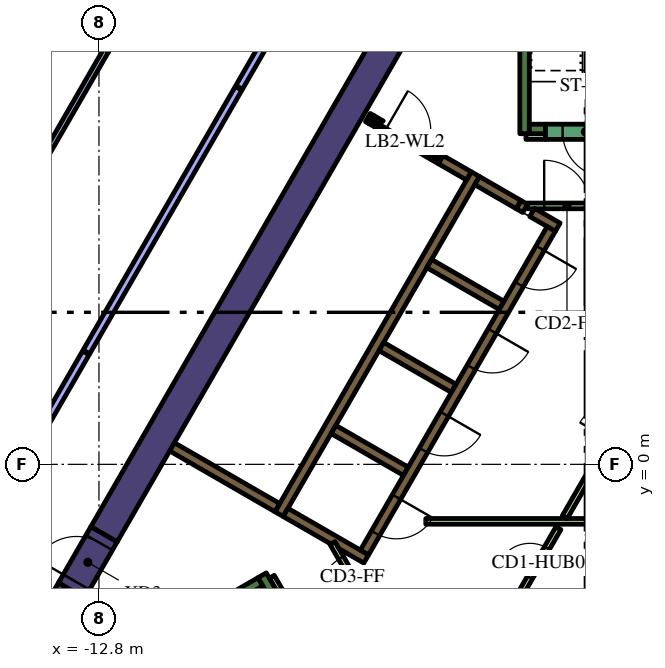
"""IFC4 building model, lengths in metres.
Left out: names, types, materials, properties, quantities, classifications, styles, units other than length and angle.
Written with IfcOpenShell. Run it as: python <this file> out.ifc"""

import sys

from ifc_helpers import new_model, si_unit, direction, frame, frame_2d, origin, place, context, subcontext, project, spatial, polyline, rectangle, outline, extrude, element, fill, save


model = new_model("IFC4")
c1 = context("Model", 3, precision=1e-05, world=origin(), true_north=direction((0.0, 1.0)))
c2 = subcontext(c1, "Body", "Model", "MODEL_VIEW")
j1 = project(units=[si_unit("LENGTHUNIT", "METRE"), si_unit("PLANEANGLEUNIT", "RADIAN")], contexts=[c1])
p1 = place(None, origin())
s1 = spatial("IfcSite", under=j1, at=p1, CompositionType="ELEMENT")
p2 = place(p1, origin())
s2 = spatial("IfcBuilding", under=s1, at=p2, CompositionType="ELEMENT")
p3 = place(p2, frame((0.0, 0.0, 171.0)))
s3 = spatial("IfcBuildingStorey", under=s2, at=p3, CompositionType="ELEMENT", Elevation=171.0)
p4 = place(p3, frame((-13.518, -3.314, 0.0), z_axis=(0.0, 0.0, 1.0), x_axis=(-0.499969377405, -0.866043083026, 0.0)))
e1 = element("IfcWall", 1, at=p4, inside=s3, PredefinedType="SOLIDWALL", context=c2, shape_type="SweptSolid", body=[
    extrude(rectangle(XDim=2.824, YDim=0.8, at=frame_2d((1.412, 0.0))), origin(), (0.0, 0.0, 1.0), 4.2),
])
p5 = place(p3, frame((-12.668, -1.842, 0.0), z_axis=(0.0, 0.0, 1.0), x_axis=(0.500003640647, 0.866023301845, 0.0)))
e2 = element("IfcWall", 2, at=p5, inside=s3, PredefinedType="SOLIDWALL", context=c2, shape_type="SweptSolid", body=[
    extrude(rectangle(XDim=15.858, YDim=0.8, at=frame_2d((7.929, 0.0))), origin(), (0.0, 0.0, 1.0), 4.2),
])
p6 = place(p3, frame((-1.6, 8.7, 0.0), z_axis=(0.0, 0.0, 1.0), x_axis=(0.0, 1.0, 0.0)))
e3 = element("IfcWall", 3, at=p6, inside=s3, PredefinedType="SOLIDWALL", context=c2, shape_type="SweptSolid", body=[
    extrude(rectangle(XDim=7.05, YDim=0.25, at=frame_2d((3.525, 0.0))), origin(), (0.0, 0.0, 1.0), 4.2),
])
p7 = place(p3, frame((-1.475, 8.825, 0.0), z_axis=(0.0, 0.0, 1.0), x_axis=(1.0, 0.0, 0.0)))
e4 = element("IfcWall", 4, at=p7, inside=s3, PredefinedType="SOLIDWALL", context=c2, shape_type="SweptSolid", body=[
    extrude(rectangle(XDim=0.425, YDim=0.25, at=frame_2d((0.212, 0.0))), origin(), (0.0, 0.0, 1.0), 4.2),
])
p8 = place(p3, frame((-14.44, -6.49, 0.0), z_axis=(0.0, 0.0, 1.0), x_axis=(0.866022966069, 0.500004222222, 0.0)))
e5 = element("IfcWall", 5, at=p8, inside=s3, PredefinedType="SOLIDWALL", context=c2, shape_type="SweptSolid", body=[
    extrude(rectangle(XDim=6.8, YDim=0.25, at=frame_2d((3.4, 0.0))), origin(), (0.0, 0.0, 1.0), 4.2),
])
p9 = place(p3, frame((-8.168, -3.503, 0.0), z_axis=(0.0, 0.0, 1.0), x_axis=(-0.499952099219, 0.866053057547, 0.0)))
e6 = element("IfcWall", 6, at=p9, inside=s3, PredefinedType="SOLIDWALL", context=c2, shape_type="SweptSolid", body=[
    extrude(rectangle(XDim=0.675, YDim=0.25, at=frame_2d((0.337, 0.0))), origin(), (0.0, 0.0, 1.0), 4.2),
])
p10 = place(p3, frame((-8.06, -1.311, 0.0), z_axis=(0.0, 0.0, 1.0), x_axis=(0.50000273126, 0.866023826885, 0.0)))
e7 = element("IfcWall", 7, at=p10, inside=s3, PredefinedType="SOLIDWALL", context=c2, shape_type="SweptSolid", body=[
    extrude(rectangle(XDim=10.33, YDim=0.25, at=frame_2d((5.165, 0.0))), origin(), (0.0, 0.0, 1.0), 4.2),
])
p11 = place(p3, frame((-1.758, 6.835, 0.0), z_axis=(0.0, 0.0, 1.0), x_axis=(0.865982457891, -0.500074377092, 0.0)))
e8 = element("IfcWall", 8, at=p11, inside=s3, PredefinedType="SOLIDWALL", context=c2, shape_type="SweptSolid", body=[
    extrude(rectangle(XDim=0.2, YDim=0.25, at=frame_2d((0.1, 0.0))), origin(), (0.0, 0.0, 1.0), 4.2),
])
p12 = place(p3, frame((-1.76, 6.836, 0.0), z_axis=(0.0, 0.0, 1.0), x_axis=(-0.865952863304, 0.500125622755, 0.0)))
e9 = element("IfcWall", 9, at=p12, inside=s3, PredefinedType="SOLIDWALL", context=c2, shape_type="SweptSolid", body=[
    extrude(rectangle(XDim=1.258, YDim=0.25, at=frame_2d((0.629, 0.0))), origin(), (0.0, 0.0, 1.0), 4.2),
])
p13 = place(p3, frame((-0.728, 6.24, 0.0), z_axis=(0.0, 0.0, 1.0), x_axis=(-0.865955664968, 0.500120771724, 0.0)))
e10 = element("IfcWall", 10, at=p13, inside=s3, PredefinedType="SOLIDWALL", context=c2, shape_type="SweptSolid", body=[
    extrude(rectangle(XDim=0.778, YDim=0.25, at=frame_2d((0.389, 0.0))), origin(), (0.0, 0.0, 1.0), 4.2),
])
for number, where, z_axis, x_axis in (
    (11, (-2.204, 4.182, 0.0), (0.0, 0.0, 1.0), (-0.866, 0.5, 0.0)),
    (12, (-5.369, 3.1, 0.0), (0.0, 0.0, 1.0), (0.866, -0.5, 0.0)),
    (13, (-4.724, -0.182, 0.0), (0.0, 0.0, 1.0), (-0.866, 0.5, 0.0)),
):
    element("IfcWall", number, at=place(p3, frame(where, z_axis=z_axis, x_axis=x_axis)), inside=s3, PredefinedType="SOLIDWALL", context=c2, shape_type="SweptSolid", body=[
        extrude(rectangle(XDim=2.2, YDim=0.25, at=frame_2d((1.1, 0.0))), origin(), (0.0, 0.0, 1.0), 4.2),
    ])
p14 = place(p3, origin())
e14 = element("IfcWall", 14, at=p14, inside=s3, PredefinedType="SOLIDWALL", context=c2, shape_type="SweptSolid", body=[
    extrude(outline(polyline([(-5.922, -2.257), (-5.922, -2.257), (-5.705, -2.382), (-5.83, -2.598), (-6.483, -2.221), (-6.591, -2.033), (-6.591, -2.033), (-6.7, -2.096), (-7.952, -1.373), (-7.827, -1.156), (-5.922, -2.257)])), origin(), (0.0, 0.0, 1.0), 4.2),
])
p15 = place(p3, frame((-8.106, -1.14, 0.0), z_axis=(0.0, 0.0, 1.0), x_axis=(-0.866008981251, 0.500028443584, 0.0)))
e15 = element("IfcWall", 15, at=p15, inside=s3, PredefinedType="SOLIDWALL", context=c2, shape_type="SweptSolid", body=[
    extrude(rectangle(XDim=3.2, YDim=0.25, at=frame_2d((1.6, 0.0))), origin(), (0.0, 0.0, 1.0), 4.2),
])
p16 = place(p3, frame((-5.725, 9.125, 0.0), z_axis=(0.0, 0.0, 1.0), x_axis=(0.866185586049, -0.49972245349, 0.0)))
e16 = element("IfcWall", 16, at=p16, inside=s3, PredefinedType="SOLIDWALL", context=c2, shape_type="SweptSolid", body=[
    extrude(rectangle(XDim=0.11, YDim=0.25, at=frame_2d((0.055, 0.0))), origin(), (0.0, 0.0, 1.0), 4.2),
])
p17 = place(p3, frame((-3.066, 7.59, 0.0), z_axis=(0.0, 0.0, 1.0), x_axis=(-0.866081358704, 0.49990307071, 0.0)))
e17 = element("IfcWall", 17, at=p17, inside=s3, PredefinedType="SOLIDWALL", context=c2, shape_type="SweptSolid", body=[
    extrude(rectangle(XDim=0.858, YDim=0.25, at=frame_2d((0.429, 0.0))), origin(), (0.0, 0.0, 1.0), 4.2),
])
e18 = element("IfcWall", 18, at=p14, inside=s3, PredefinedType="SOLIDWALL", context=c2, shape_type="SweptSolid", body=[
    extrude(outline(polyline([(-3.748, 8.128), (-3.813, 8.015), (-4.027, 8.139), (-4.017, 8.156), (-4.008, 8.173), (-4.0, 8.192), (-3.995, 8.21), (-3.991, 8.23), (-3.99, 8.25), (-3.99, 8.268), (-3.748, 8.128)])), origin(), (0.0, 0.0, 1.0), 4.2),
])
e19 = element("IfcWall", 19, at=p14, inside=s3, PredefinedType="SOLIDWALL", context=c2, shape_type="SweptSolid", body=[
    extrude(outline(polyline([(-5.689, 8.96), (-5.69, 8.961), (-5.565, 9.177), (-5.319, 9.035), (-5.335, 9.026), (-5.351, 9.015), (-5.366, 9.002), (-5.379, 8.988), (-5.392, 8.972), (-5.402, 8.956), (-5.412, 8.939), (-5.629, 9.064), (-5.629, 9.064), (-5.689, 8.96)])), origin(), (0.0, 0.0, 1.0), 4.2),
])
for number, where, z_axis, x_axis in (
    (20, (-8.252, -2.958, 0.0), (0.0, 0.0, 1.0), (0.5, -0.866, 0.0)),
    (21, (-1.564, 8.625, 0.0), (0.0, 0.0, 1.0), (1.0, 0.0, 0.0)),
):
    element("IfcWall", number, at=place(p3, frame(where, z_axis=z_axis, x_axis=x_axis)), inside=s3, PredefinedType="PARTITIONING", context=c2, shape_type="SweptSolid", body=[
        extrude(rectangle(XDim=0.514, YDim=0.15, at=frame_2d((0.257, 0.0))), origin(), (0.0, 0.0, 1.0), 3.15),
    ])
p18 = place(p3, frame((-4.2, -1.5, 0.0), z_axis=(0.0, 0.0, 1.0), x_axis=(1.0, 0.0, 0.0)))
e22 = element("IfcWall", 22, at=p18, inside=s3, PredefinedType="PARTITIONING", context=c2, shape_type="SweptSolid", body=[
    extrude(rectangle(XDim=9.359, YDim=0.15, at=frame_2d((4.68, 0.0))), origin(), (0.0, 0.0, 1.0), 3.15),
])
p19 = place(p3, frame((-0.544, -1.393, 0.0), z_axis=(0.0, 0.0, 1.0), x_axis=(0.499928740635, 0.866066541489, 0.0)))
e23 = element("IfcWall", 23, at=p19, inside=s3, PredefinedType="PARTITIONING", context=c2, shape_type="SweptSolid", body=[
    extrude(rectangle(XDim=1.912, YDim=0.15, at=frame_2d((0.956, 0.0))), origin(), (0.0, 0.0, 1.0), 3.15),
])
p20 = place(p3, frame((-0.898, 6.194, 0.0), z_axis=(0.0, 0.0, 1.0), x_axis=(-0.499996202215, -0.866027596426, 0.0)))
e24 = element("IfcWall", 24, at=p20, inside=s3, PredefinedType="SOLIDWALL", context=c2, shape_type="SweptSolid", body=[
    extrude(rectangle(XDim=9.83, YDim=0.25, at=frame_2d((4.915, 0.0))), origin(), (0.0, 0.0, 1.0), 4.2),
])
p21 = place(p20, frame((0.585, 0.0, 0.0)))
e25 = element("IfcOpeningElement", 25, at=p21, cuts=e24, PredefinedType="OPENING", context=c2, shape_type="SweptSolid", body=[
    extrude(rectangle(XDim=1.1, YDim=2.1, at=frame_2d((0.55, 1.05))), frame((0.0, 0.135, 0.0), z_axis=(0.0, -1.0, 0.0), x_axis=(1.0, 0.0, 0.0)), (0.0, 0.0, 1.0), 0.27),
])
p22 = place(p20, frame((3.105, 0.0, 0.0)))
e26 = element("IfcOpeningElement", 26, at=p22, cuts=e24, PredefinedType="OPENING", context=c2, shape_type="SweptSolid", body=[
    extrude(rectangle(XDim=1.1, YDim=2.1, at=frame_2d((0.55, 1.05))), frame((0.0, 0.135, 0.0), z_axis=(0.0, -1.0, 0.0), x_axis=(1.0, 0.0, 0.0)), (0.0, 0.0, 1.0), 0.27),
])
p23 = place(p20, frame((5.625, 0.0, 0.0)))
e27 = element("IfcOpeningElement", 27, at=p23, cuts=e24, PredefinedType="OPENING", context=c2, shape_type="SweptSolid", body=[
    extrude(rectangle(XDim=1.1, YDim=2.1, at=frame_2d((0.55, 1.05))), frame((0.0, 0.135, 0.0), z_axis=(0.0, -1.0, 0.0), x_axis=(1.0, 0.0, 0.0)), (0.0, 0.0, 1.0), 0.27),
])
p24 = place(p20, frame((8.145, 0.0, 0.0)))
e28 = element("IfcOpeningElement", 28, at=p24, cuts=e24, PredefinedType="OPENING", context=c2, shape_type="SweptSolid", body=[
    extrude(rectangle(XDim=1.1, YDim=2.1, at=frame_2d((0.55, 1.05))), frame((0.0, 0.135, 0.0), z_axis=(0.0, -1.0, 0.0), x_axis=(1.0, 0.0, 0.0)), (0.0, 0.0, 1.0), 0.27),
])
p25 = place(p3, frame((1.05, 8.75, 0.0), z_axis=(0.0, 0.0, 1.0), x_axis=(-1.0, 0.0, 0.0)))
e29 = element("IfcWall", 29, at=p25, inside=s3, PredefinedType="SOLIDWALL", context=c2, shape_type="SweptSolid", body=[
    extrude(rectangle(XDim=2.1, YDim=0.4, at=frame_2d((1.05, 0.0))), origin(), (0.0, 0.0, 1.0), 4.2),
])
p26 = place(p25, frame((0.45, 0.0, 0.0)))
e30 = element("IfcOpeningElement", 30, at=p26, cuts=e29, PredefinedType="OPENING", context=c2, shape_type="SweptSolid", body=[
    extrude(rectangle(XDim=1.2, YDim=2.1, at=frame_2d((0.6, 1.05))), frame((0.0, 0.21, 0.0), z_axis=(0.0, -1.0, 0.0), x_axis=(1.0, 0.0, 0.0)), (0.0, 0.0, 1.0), 0.42),
])
p27 = place(p3, frame((-1.76, -3.498, 0.0), z_axis=(0.0, 0.0, 1.0), x_axis=(0.499977374825, 0.866038466041, 0.0)))
e31 = element("IfcWall", 31, at=p27, inside=s3, PredefinedType="PARTITIONING", context=c2, shape_type="SweptSolid", body=[
    extrude(rectangle(XDim=2.1, YDim=0.15, at=frame_2d((1.05, 0.0))), origin(), (0.0, 0.0, 1.0), 3.15),
])
p28 = place(p27, frame((0.6, 0.0, 0.0)))
e32 = element("IfcOpeningElement", 32, at=p28, cuts=e31, PredefinedType="OPENING", context=c2, shape_type="SweptSolid", body=[
    extrude(rectangle(XDim=0.9, YDim=2.1, at=frame_2d((0.45, 1.05))), frame((0.0, 0.085, 0.0), z_axis=(0.0, -1.0, 0.0), x_axis=(1.0, 0.0, 0.0)), (0.0, 0.0, 1.0), 0.17),
])
p29 = place(p3, frame((-1.534, 6.8, 0.0), z_axis=(0.0, 0.0, 1.0), x_axis=(1.0, 0.0, 0.0)))
e33 = element("IfcWall", 33, at=p29, inside=s3, PredefinedType="PARTITIONING", context=c2, shape_type="SweptSolid", body=[
    extrude(rectangle(XDim=2.1, YDim=0.15, at=frame_2d((1.05, 0.0))), origin(), (0.0, 0.0, 1.0), 3.15),
])
p30 = place(p29, frame((0.45, 0.0, 0.0)))
e34 = element("IfcOpeningElement", 34, at=p30, cuts=e33, PredefinedType="OPENING", context=c2, shape_type="SweptSolid", body=[
    extrude(rectangle(XDim=1.2, YDim=2.1, at=frame_2d((0.6, 1.05))), frame((0.0, 0.085, 0.0), z_axis=(0.0, -1.0, 0.0), x_axis=(1.0, 0.0, 0.0)), (0.0, 0.0, 1.0), 0.17),
])
p31 = place(p3, frame((-5.606, -3.89, 0.0), z_axis=(0.0, 0.0, 1.0), x_axis=(-0.500027713859, 0.866009402589, 0.0)))
e35 = element("IfcWall", 35, at=p31, inside=s3, PredefinedType="PARTITIONING", context=c2, shape_type="SweptSolid", body=[
    extrude(rectangle(XDim=2.1, YDim=0.15, at=frame_2d((1.05, 0.0))), origin(), (0.0, 0.0, 1.0), 3.15),
])
p32 = place(p31, frame((0.45, 0.0, 0.0)))
e36 = element("IfcOpeningElement", 36, at=p32, cuts=e35, PredefinedType="OPENING", context=c2, shape_type="SweptSolid", body=[
    extrude(rectangle(XDim=1.2, YDim=2.1, at=frame_2d((0.6, 1.05))), frame((0.0, 0.085, 0.0), z_axis=(0.0, -1.0, 0.0), x_axis=(1.0, 0.0, 0.0)), (0.0, 0.0, 1.0), 0.17),
])
p33 = place(p3, frame((-5.659, 9.012, 0.0), z_axis=(0.0, 0.0, 1.0), x_axis=(0.866009402589, -0.500027713859, 0.0)))
e37 = element("IfcWall", 37, at=p33, inside=s3, PredefinedType="PARTITIONING", context=c2, shape_type="SweptSolid", body=[
    extrude(rectangle(XDim=2.1, YDim=0.12, at=frame_2d((1.05, 0.0))), origin(), (0.0, 0.0, 1.0), 3.15),
])
p34 = place(p33, frame((0.45, 0.0, 0.0)))
e38 = element("IfcOpeningElement", 38, at=p34, cuts=e37, PredefinedType="OPENING", context=c2, shape_type="SweptSolid", body=[
    extrude(rectangle(XDim=1.2, YDim=2.1, at=frame_2d((0.6, 1.05))), frame((0.0, 0.07, 0.0), z_axis=(0.0, -1.0, 0.0), x_axis=(1.0, 0.0, 0.0)), (0.0, 0.0, 1.0), 0.14),
])
p35 = place(p3, frame((-13.518, -3.314, 0.0), z_axis=(0.0, 0.0, 1.0), x_axis=(0.500000056704, 0.866025371046, 0.0)))
e39 = element("IfcWall", 39, at=p35, inside=s3, PredefinedType="SOLIDWALL", context=c2, shape_type="SweptSolid", body=[
    extrude(rectangle(XDim=1.7, YDim=0.8, at=frame_2d((0.85, 0.0))), origin(), (0.0, 0.0, 1.0), 4.2),
])
p36 = place(p35, frame((0.25, 0.0, 0.0)))
e40 = element("IfcOpeningElement", 40, at=p36, cuts=e39, PredefinedType="OPENING", context=c2, shape_type="SweptSolid", body=[
    extrude(rectangle(XDim=1.2, YDim=2.1, at=frame_2d((0.6, 1.05))), frame((0.0, 0.41, 0.0), z_axis=(0.0, -1.0, 0.0), x_axis=(1.0, 0.0, 0.0)), (0.0, 0.0, 1.0), 0.82),
])
p37 = place(p3, frame((-12.608, 10.899, 0.0), z_axis=(0.0, 0.0, 1.0), x_axis=(-0.499991792115, -0.866030142557, 0.0)))
e41 = element("IfcWall", 41, at=p37, inside=s3, PredefinedType="PARTITIONING", context=c2, shape_type="SweptSolid", body=[
    extrude(rectangle(XDim=3.06, YDim=0.15, at=frame_2d((1.53, 0.0))), origin(), (0.0, 0.0, 1.0), 3.15),
])
p38 = place(p3, frame((-9.126, 9.893, 0.0), z_axis=(0.0, 0.0, 1.0), x_axis=(-0.499995158272, -0.866028199139, 0.0)))
e42 = element("IfcWall", 42, at=p38, inside=s3, PredefinedType="PARTITIONING", context=c2, shape_type="SweptSolid", body=[
    extrude(rectangle(XDim=8.008, YDim=0.2, at=frame_2d((4.004, 0.0))), origin(), (0.0, 0.0, 1.0), 3.15),
])
p39 = place(p3, frame((-13.146, 2.931, 0.0), z_axis=(0.0, 0.0, 1.0), x_axis=(-0.499997861235, -0.866026638597, 0.0)))
e43 = element("IfcWall", 43, at=p39, inside=s3, PredefinedType="PARTITIONING", context=c2, shape_type="SweptSolid", body=[
    extrude(rectangle(XDim=10.717, YDim=0.2, at=frame_2d((5.359, 0.0))), origin(), (0.0, 0.0, 1.0), 3.15),
])
p40 = place(p39, frame((4.9, 0.0, 0.0)))
e44 = element("IfcOpeningElement", 44, at=p40, cuts=e43, PredefinedType="OPENING", context=c2, shape_type="SweptSolid", body=[
    extrude(rectangle(XDim=1.0, YDim=2.1, at=frame_2d((0.5, 1.05))), frame((0.0, 0.11, 0.0), z_axis=(0.0, -1.0, 0.0), x_axis=(1.0, 0.0, 0.0)), (0.0, 0.0, 1.0), 0.22),
])
p41 = place(p3, frame((-4.757, 17.461, 0.0), z_axis=(0.0, 0.0, 1.0), x_axis=(-0.499998278779, -0.866026397529, 0.0)))
e45 = element("IfcWall", 45, at=p41, inside=s3, PredefinedType="PARTITIONING", context=c2, shape_type="SweptSolid", body=[
    extrude(rectangle(XDim=8.709, YDim=0.2, at=frame_2d((4.354, 0.0))), origin(), (0.0, 0.0, 1.0), 3.15),
])
p42 = place(p21, origin())
e46 = element("IfcDoor", 46, at=p42, inside=s3, OperationType="DOUBLE_DOOR_SLIDING", PredefinedType="DOOR", context=c2, shape_type="SweptSolid", body=[
    extrude(rectangle(XDim=1.1, YDim=2.1, at=frame_2d((0.55, 1.05))), frame((0.0, 0.025, 0.0), z_axis=(0.0, -1.0, 0.0), x_axis=(1.0, 0.0, 0.0)), (0.0, 0.0, 1.0), 0.05),
])
fill(e25, e46)
p43 = place(p22, origin())
e47 = element("IfcDoor", 47, at=p43, inside=s3, OperationType="DOUBLE_DOOR_SLIDING", PredefinedType="DOOR", context=c2, shape_type="SweptSolid", body=[
    extrude(rectangle(XDim=1.1, YDim=2.1, at=frame_2d((0.55, 1.05))), frame((0.0, 0.025, 0.0), z_axis=(0.0, -1.0, 0.0), x_axis=(1.0, 0.0, 0.0)), (0.0, 0.0, 1.0), 0.05),
])
fill(e26, e47)
p44 = place(p23, origin())
e48 = element("IfcDoor", 48, at=p44, inside=s3, OperationType="DOUBLE_DOOR_SLIDING", PredefinedType="DOOR", context=c2, shape_type="SweptSolid", body=[
    extrude(rectangle(XDim=1.1, YDim=2.1, at=frame_2d((0.55, 1.05))), frame((0.0, 0.025, 0.0), z_axis=(0.0, -1.0, 0.0), x_axis=(1.0, 0.0, 0.0)), (0.0, 0.0, 1.0), 0.05),
])
fill(e27, e48)
p45 = place(p24, origin())
e49 = element("IfcDoor", 49, at=p45, inside=s3, OperationType="DOUBLE_DOOR_SLIDING", PredefinedType="DOOR", context=c2, shape_type="SweptSolid", body=[
    extrude(rectangle(XDim=1.1, YDim=2.1, at=frame_2d((0.55, 1.05))), frame((0.0, 0.025, 0.0), z_axis=(0.0, -1.0, 0.0), x_axis=(1.0, 0.0, 0.0)), (0.0, 0.0, 1.0), 0.05),
])
fill(e28, e49)
p46 = place(p26, origin())
e50 = element("IfcDoor", 50, at=p46, inside=s3, OperationType="SINGLE_SWING_LEFT", PredefinedType="DOOR", context=c2, shape_type="SweptSolid", body=[
    extrude(rectangle(XDim=1.2, YDim=2.1, at=frame_2d((0.6, 1.05))), frame((0.0, 0.025, 0.0), z_axis=(0.0, -1.0, 0.0), x_axis=(1.0, 0.0, 0.0)), (0.0, 0.0, 1.0), 0.05),
])
fill(e30, e50)
p47 = place(p28, origin())
e51 = element("IfcDoor", 51, at=p47, inside=s3, OperationType="SINGLE_SWING_LEFT", PredefinedType="DOOR", context=c2, shape_type="SweptSolid", body=[
    extrude(rectangle(XDim=0.9, YDim=2.1, at=frame_2d((0.45, 1.05))), frame((0.0, 0.025, 0.0), z_axis=(0.0, -1.0, 0.0), x_axis=(1.0, 0.0, 0.0)), (0.0, 0.0, 1.0), 0.05),
])
fill(e32, e51)
p48 = place(p30, origin())
e52 = element("IfcDoor", 52, at=p48, inside=s3, OperationType="SINGLE_SWING_LEFT", PredefinedType="DOOR", context=c2, shape_type="SweptSolid", body=[
    extrude(rectangle(XDim=1.2, YDim=2.1, at=frame_2d((0.6, 1.05))), frame((0.0, 0.025, 0.0), z_axis=(0.0, -1.0, 0.0), x_axis=(1.0, 0.0, 0.0)), (0.0, 0.0, 1.0), 0.05),
])
fill(e34, e52)
p49 = place(p32, origin())
e53 = element("IfcDoor", 53, at=p49, inside=s3, OperationType="SINGLE_SWING_LEFT", PredefinedType="DOOR", context=c2, shape_type="SweptSolid", body=[
    extrude(rectangle(XDim=1.2, YDim=2.1, at=frame_2d((0.6, 1.05))), frame((0.0, 0.025, 0.0), z_axis=(0.0, -1.0, 0.0), x_axis=(1.0, 0.0, 0.0)), (0.0, 0.0, 1.0), 0.05),
])
fill(e36, e53)
p50 = place(p34, origin())
e54 = element("IfcDoor", 54, at=p50, inside=s3, OperationType="SINGLE_SWING_LEFT", PredefinedType="DOOR", context=c2, shape_type="SweptSolid", body=[
    extrude(rectangle(XDim=1.2, YDim=2.1, at=frame_2d((0.6, 1.05))), frame((0.0, 0.025, 0.0), z_axis=(0.0, -1.0, 0.0), x_axis=(1.0, 0.0, 0.0)), (0.0, 0.0, 1.0), 0.05),
])
fill(e38, e54)
p51 = place(p36, origin())
e55 = element("IfcDoor", 55, at=p51, inside=s3, OperationType="SINGLE_SWING_LEFT", PredefinedType="DOOR", context=c2, shape_type="SweptSolid", body=[
    extrude(rectangle(XDim=1.2, YDim=2.1, at=frame_2d((0.6, 1.05))), frame((0.0, 0.025, 0.0), z_axis=(0.0, -1.0, 0.0), x_axis=(1.0, 0.0, 0.0)), (0.0, 0.0, 1.0), 0.05),
])
fill(e40, e55)
save(model, sys.argv[1])
